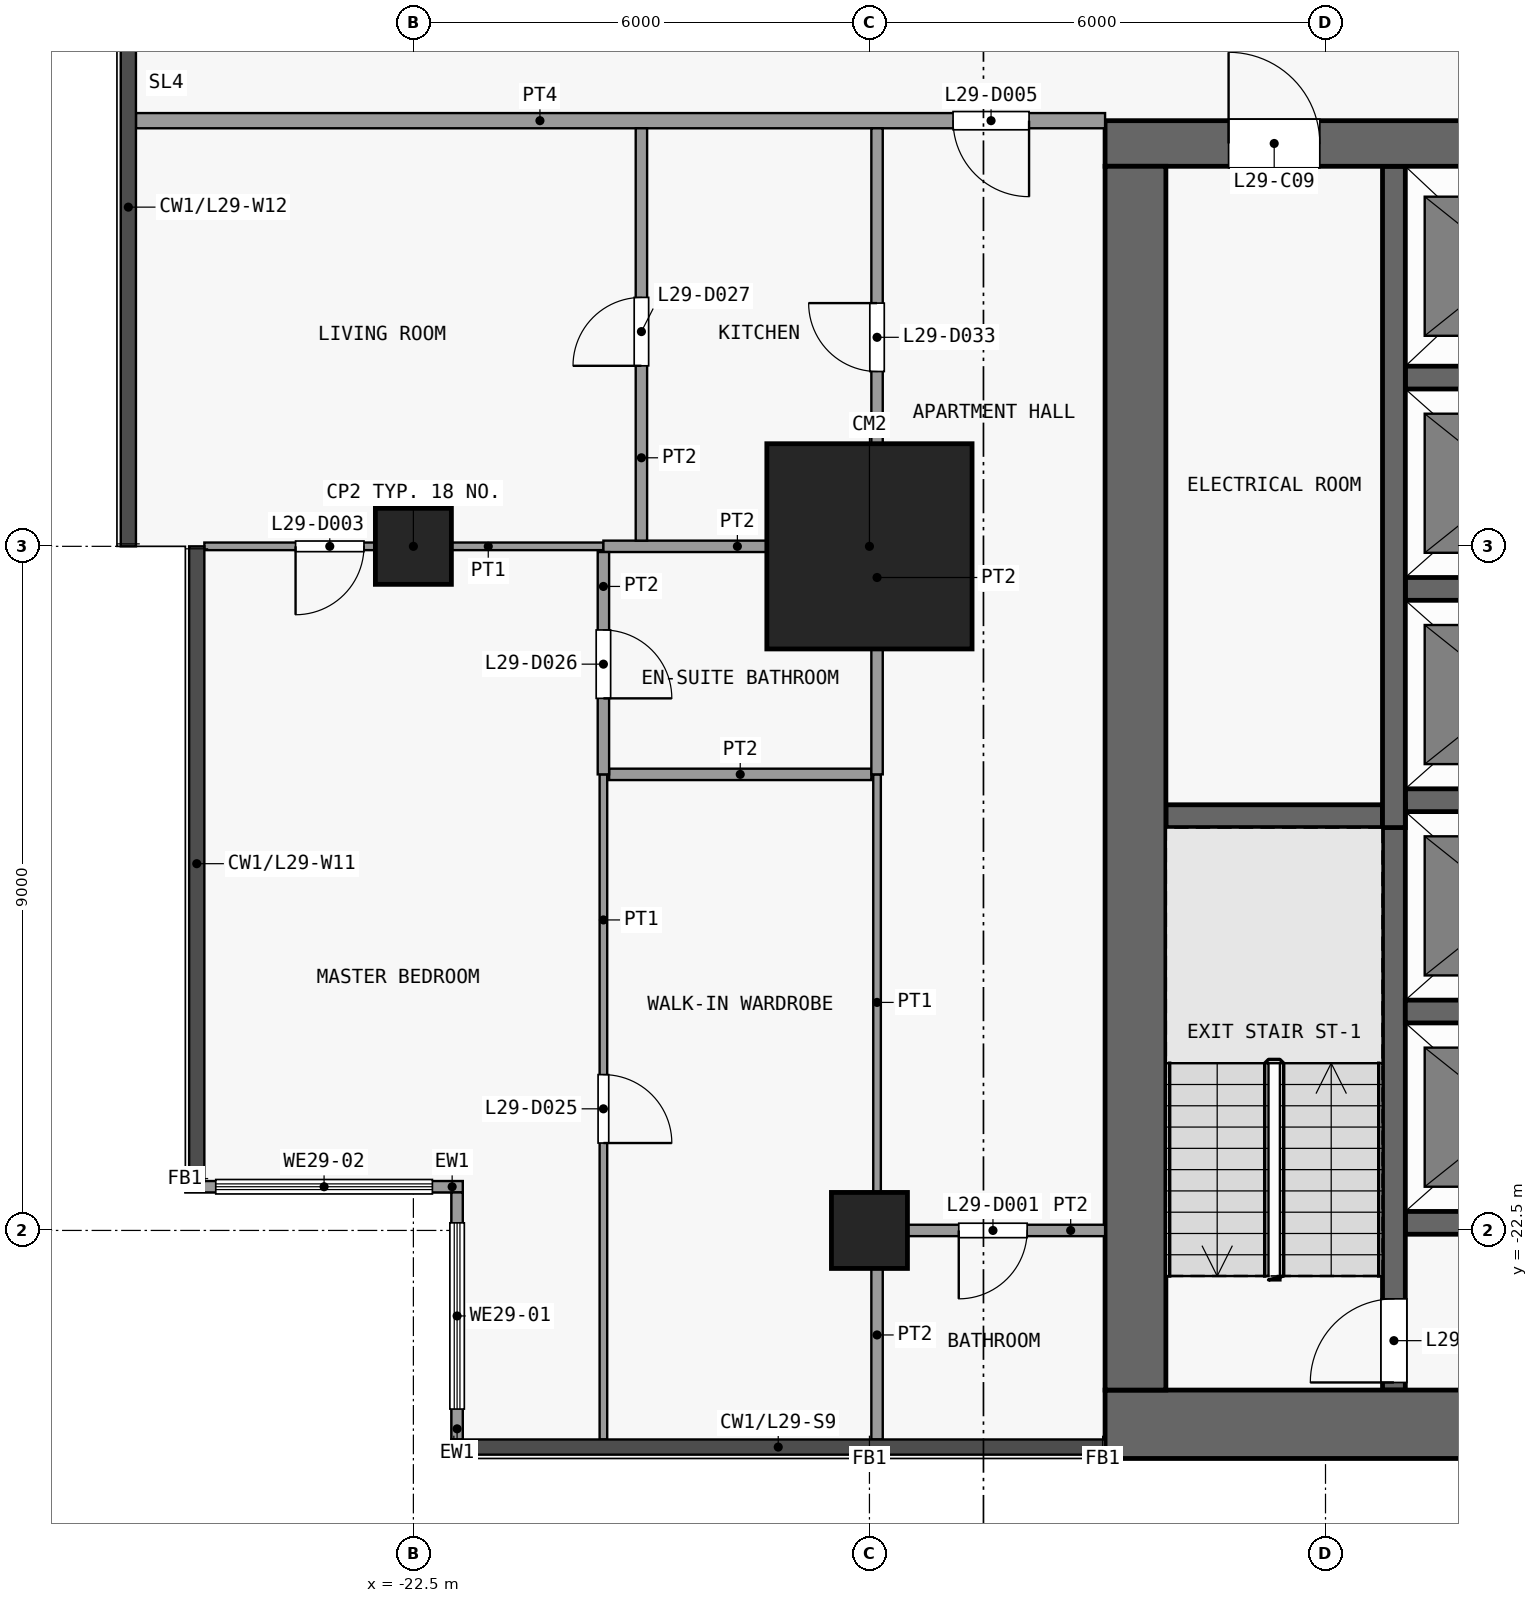
"""IFC4 building model, lengths in metres.
Left out: names, types, materials, properties, quantities, classifications, styles, units other than length and angle.
Written with IfcOpenShell. Run it as: python <this file> out.ifc"""

import sys

from ifc_helpers import new_model, si_unit, direction, frame, frame_2d, origin, origin_2d, place, context, subcontext, project, spatial, rectangle, extrude, element, fill, save


model = new_model("IFC4")
c1 = context("Model", 3, precision=1e-05, world=origin(), true_north=direction((0.0, 1.0)))
c2 = subcontext(c1, "Body", "Model", "MODEL_VIEW")
j1 = project(units=[si_unit("LENGTHUNIT", "METRE"), si_unit("PLANEANGLEUNIT", "RADIAN")], contexts=[c1])
p1 = place(None, origin())
s1 = spatial("IfcSite", under=j1, at=p1, CompositionType="ELEMENT")
p2 = place(p1, origin())
s2 = spatial("IfcBuilding", under=s1, at=p2, CompositionType="ELEMENT")
p3 = place(p2, frame((0.0, 0.0, 117.1)))
s3 = spatial("IfcBuildingStorey", under=s2, at=p3, CompositionType="ELEMENT", Elevation=117.1)
for number, where, z_axis, x_axis in (
    (1, (-22.5, -13.5, 0.0), (0.0, 0.0, 1.0), (1.0, 0.0, 0.0)),
    (2, (-16.5, -22.5, 0.0), (0.0, 0.0, 1.0), (1.0, 0.0, 0.0)),
):
    element("IfcColumn", number, at=place(p3, frame(where, z_axis=z_axis, x_axis=x_axis)), inside=s3, PredefinedType="COLUMN", context=c2, shape_type="SweptSolid", body=[
        extrude(rectangle(XDim=1.0, YDim=1.0, at=origin_2d()), origin(), (0.0, 0.0, 1.0), 3.6),
    ])
p4 = place(p3, frame((-16.5, -13.5, 0.0), z_axis=(0.0, 0.0, 1.0), x_axis=(1.0, 0.0, 0.0)))
e3 = element("IfcColumn", 3, at=p4, inside=s3, PredefinedType="COLUMN", context=c2, shape_type="SweptSolid", body=[
    extrude(rectangle(XDim=2.7, YDim=2.7, at=origin_2d()), origin(), (0.0, 0.0, 1.0), 3.6),
])
p5 = place(p3, frame((-13.4, -25.05, 0.0), z_axis=(0.0, 0.0, 1.0), x_axis=(1.0, 0.0, 0.0)))
e4 = element("IfcWall", 4, at=p5, inside=s3, PredefinedType="SHEAR", context=c2, shape_type="SweptSolid", body=[
    extrude(rectangle(XDim=26.8, YDim=0.9, at=frame_2d((13.4, 0.0))), origin(), (0.0, 0.0, 1.0), 3.3),
])
p6 = place(p3, frame((-13.4, -8.2, 0.0), z_axis=(0.0, 0.0, 1.0), x_axis=(1.0, 0.0, 0.0)))
e5 = element("IfcWall", 5, at=p6, inside=s3, PredefinedType="SHEAR", context=c2, shape_type="SweptSolid", body=[
    extrude(rectangle(XDim=26.8, YDim=0.6, at=frame_2d((13.4, 0.0))), origin(), (0.0, 0.0, 1.0), 3.3),
])
p7 = place(p6, frame((7.7, 0.0, 0.0)))
e6 = element("IfcOpeningElement", 6, at=p7, cuts=e5, PredefinedType="OPENING", context=c2, shape_type="SweptSolid", body=[
    extrude(rectangle(XDim=1.8, YDim=2.1, at=frame_2d((0.9, 1.05))), frame((0.0, 0.31, 0.0), z_axis=(0.0, -1.0, 0.0), x_axis=(1.0, 0.0, 0.0)), (0.0, 0.0, 1.0), 0.62),
])
p8 = place(p6, frame((17.3, 0.0, 0.0)))
e7 = element("IfcOpeningElement", 7, at=p8, cuts=e5, PredefinedType="OPENING", context=c2, shape_type="SweptSolid", body=[
    extrude(rectangle(XDim=1.8, YDim=2.1, at=frame_2d((0.9, 1.05))), frame((0.0, 0.31, 0.0), z_axis=(0.0, -1.0, 0.0), x_axis=(1.0, 0.0, 0.0)), (0.0, 0.0, 1.0), 0.62),
])
p9 = place(p6, frame((1.625, 0.0, 0.0)))
e8 = element("IfcOpeningElement", 8, at=p9, cuts=e5, PredefinedType="OPENING", context=c2, shape_type="SweptSolid", body=[
    extrude(rectangle(XDim=1.2, YDim=2.1, at=frame_2d((0.6, 1.05))), frame((0.0, 0.31, 0.0), z_axis=(0.0, -1.0, 0.0), x_axis=(1.0, 0.0, 0.0)), (0.0, 0.0, 1.0), 0.62),
])
p10 = place(p6, frame((23.275, 0.0, 0.0)))
e9 = element("IfcOpeningElement", 9, at=p10, cuts=e5, PredefinedType="OPENING", context=c2, shape_type="SweptSolid", body=[
    extrude(rectangle(XDim=0.9, YDim=2.1, at=frame_2d((0.45, 1.05))), frame((0.0, 0.31, 0.0), z_axis=(0.0, -1.0, 0.0), x_axis=(1.0, 0.0, 0.0)), (0.0, 0.0, 1.0), 0.62),
])
p11 = place(p3, frame((-13.0, -24.6, 0.0), z_axis=(0.0, 0.0, 1.0), x_axis=(0.0, 1.0, 0.0)))
e10 = element("IfcWall", 10, at=p11, inside=s3, PredefinedType="SHEAR", context=c2, shape_type="SweptSolid", body=[
    extrude(rectangle(XDim=16.1, YDim=0.8, at=frame_2d((8.05, 0.0))), origin(), (0.0, 0.0, 1.0), 3.3),
])
for number, where, z_axis, x_axis in (
    (11, (-9.45, -22.4, 0.0), (0.0, 0.0, 1.0), (1.0, 0.0, 0.0)),
    (12, (-9.45, -19.62, 0.0), (0.0, 0.0, 1.0), (1.0, 0.0, 0.0)),
):
    element("IfcWall", number, at=place(p3, frame(where, z_axis=z_axis, x_axis=x_axis)), inside=s3, PredefinedType="SHEAR", context=c2, shape_type="SweptSolid", body=[
        extrude(rectangle(XDim=2.8, YDim=0.3, at=frame_2d((1.4, 0.0))), origin(), (0.0, 0.0, 1.0), 3.3),
    ])
p12 = place(p3, frame((-12.6, -17.05, 0.0), z_axis=(0.0, 0.0, 1.0), x_axis=(1.0, 0.0, 0.0)))
e13 = element("IfcWall", 13, at=p12, inside=s3, PredefinedType="SHEAR", context=c2, shape_type="SweptSolid", body=[
    extrude(rectangle(XDim=2.85, YDim=0.3, at=frame_2d((1.425, 0.0))), origin(), (0.0, 0.0, 1.0), 3.3),
])
for number, where, z_axis, x_axis in (
    (14, (-9.45, -16.84, 0.0), (0.0, 0.0, 1.0), (1.0, 0.0, 0.0)),
    (15, (-9.45, -14.06, 0.0), (0.0, 0.0, 1.0), (1.0, 0.0, 0.0)),
    (16, (-9.45, -11.28, 0.0), (0.0, 0.0, 1.0), (1.0, 0.0, 0.0)),
):
    element("IfcWall", number, at=place(p3, frame(where, z_axis=z_axis, x_axis=x_axis)), inside=s3, PredefinedType="SHEAR", context=c2, shape_type="SweptSolid", body=[
        extrude(rectangle(XDim=2.8, YDim=0.3, at=frame_2d((1.4, 0.0))), origin(), (0.0, 0.0, 1.0), 3.3),
    ])
p13 = place(p3, frame((-9.6, -24.6, 0.0), z_axis=(0.0, 0.0, 1.0), x_axis=(0.0, 1.0, 0.0)))
e17 = element("IfcWall", 17, at=p13, inside=s3, PredefinedType="SHEAR", context=c2, shape_type="SweptSolid", body=[
    extrude(rectangle(XDim=7.7, YDim=0.3, at=frame_2d((3.85, 0.0))), origin(), (0.0, 0.0, 1.0), 3.3),
])
p14 = place(p13, frame((0.1, 0.0, 0.0)))
e18 = element("IfcOpeningElement", 18, at=p14, cuts=e17, PredefinedType="OPENING", context=c2, shape_type="SweptSolid", body=[
    extrude(rectangle(XDim=1.1, YDim=2.1, at=frame_2d((0.55, 1.05))), frame((0.0, 0.16, 0.0), z_axis=(0.0, -1.0, 0.0), x_axis=(1.0, 0.0, 0.0)), (0.0, 0.0, 1.0), 0.32),
])
p15 = place(p3, frame((-9.6, -17.2, 0.0), z_axis=(0.0, 0.0, 1.0), x_axis=(0.0, 1.0, 0.0)))
e19 = element("IfcWall", 19, at=p15, inside=s3, PredefinedType="SHEAR", context=c2, shape_type="SweptSolid", body=[
    extrude(rectangle(XDim=8.7, YDim=0.3, at=frame_2d((4.35, 0.0))), origin(), (0.0, 0.0, 1.0), 3.3),
])
p16 = place(p3, frame((-21.925, -25.25, 0.0), z_axis=(0.0, 0.0, 1.0), x_axis=(0.0, 1.0, 0.0)))
e20 = element("IfcWall", 20, at=p16, inside=s3, PredefinedType="SOLIDWALL", context=c2, shape_type="SweptSolid", body=[
    extrude(rectangle(XDim=3.25, YDim=0.15, at=frame_2d((1.625, 0.0))), origin(), (0.0, 0.0, 1.0), 3.3),
])
p17 = place(p16, frame((0.4, 0.0, 0.9)))
e21 = element("IfcOpeningElement", 21, at=p17, cuts=e20, PredefinedType="OPENING", context=c2, shape_type="SweptSolid", body=[
    extrude(rectangle(XDim=2.45, YDim=2.4, at=frame_2d((1.225, 1.2))), frame((0.0, 0.085, 0.0), z_axis=(0.0, -1.0, 0.0), x_axis=(1.0, 0.0, 0.0)), (0.0, 0.0, 1.0), 0.17),
])
p18 = place(p3, frame((-21.85, -21.925, 0.0), z_axis=(0.0, 0.0, 1.0), x_axis=(-1.0, 0.0, 0.0)))
e22 = element("IfcWall", 22, at=p18, inside=s3, PredefinedType="SOLIDWALL", context=c2, shape_type="SweptSolid", body=[
    extrude(rectangle(XDim=3.65, YDim=0.15, at=frame_2d((1.825, 0.0))), origin(), (0.0, 0.0, 1.0), 3.3),
])
p19 = place(p18, frame((0.4, 0.0, 0.9)))
e23 = element("IfcOpeningElement", 23, at=p19, cuts=e22, PredefinedType="OPENING", context=c2, shape_type="SweptSolid", body=[
    extrude(rectangle(XDim=2.85, YDim=2.4, at=frame_2d((1.425, 1.2))), frame((0.0, 0.085, 0.0), z_axis=(0.0, -1.0, 0.0), x_axis=(1.0, 0.0, 0.0)), (0.0, 0.0, 1.0), 0.17),
])
p20 = place(p3, frame((-16.325, -22.5, 0.0), z_axis=(0.0, 0.0, 1.0), x_axis=(1.0, 0.0, 0.0)))
e24 = element("IfcWall", 24, at=p20, inside=s3, PredefinedType="PARTITIONING", context=c2, shape_type="SweptSolid", body=[
    extrude(rectangle(XDim=2.925, YDim=0.15, at=frame_2d((1.462, 0.0))), origin(), (0.0, 0.0, 1.0), 3.3),
])
p21 = place(p20, frame((1.0, 0.0, 0.0)))
e25 = element("IfcOpeningElement", 25, at=p21, cuts=e24, PredefinedType="OPENING", context=c2, shape_type="SweptSolid", body=[
    extrude(rectangle(XDim=0.9, YDim=2.1, at=frame_2d((0.45, 1.05))), frame((0.0, 0.085, 0.0), z_axis=(0.0, -1.0, 0.0), x_axis=(1.0, 0.0, 0.0)), (0.0, 0.0, 1.0), 0.17),
])
p22 = place(p3, frame((-19.925, -16.5, 0.0), z_axis=(0.0, 0.0, 1.0), x_axis=(1.0, 0.0, 0.0)))
e26 = element("IfcWall", 26, at=p22, inside=s3, PredefinedType="PARTITIONING", context=c2, shape_type="SweptSolid", body=[
    extrude(rectangle(XDim=3.45, YDim=0.15, at=frame_2d((1.725, 0.0))), origin(), (0.0, 0.0, 1.0), 3.3),
])
p23 = place(p3, frame((-25.25, -13.5, 0.0), z_axis=(0.0, 0.0, 1.0), x_axis=(1.0, 0.0, 0.0)))
e27 = element("IfcWall", 27, at=p23, inside=s3, PredefinedType="PARTITIONING", context=c2, shape_type="SweptSolid", body=[
    extrude(rectangle(XDim=5.25, YDim=0.1, at=frame_2d((2.625, 0.0))), origin(), (0.0, 0.0, 1.0), 3.3),
])
p24 = place(p23, frame((1.2, 0.0, 0.0)))
e28 = element("IfcOpeningElement", 28, at=p24, cuts=e27, PredefinedType="OPENING", context=c2, shape_type="SweptSolid", body=[
    extrude(rectangle(XDim=0.9, YDim=2.1, at=frame_2d((0.45, 1.05))), frame((0.0, 0.06, 0.0), z_axis=(0.0, -1.0, 0.0), x_axis=(1.0, 0.0, 0.0)), (0.0, 0.0, 1.0), 0.12),
])
p25 = place(p3, frame((-20.0, -13.5, 0.0), z_axis=(0.0, 0.0, 1.0), x_axis=(1.0, 0.0, 0.0)))
e29 = element("IfcWall", 29, at=p25, inside=s3, PredefinedType="PARTITIONING", context=c2, shape_type="SweptSolid", body=[
    extrude(rectangle(XDim=3.525, YDim=0.15, at=frame_2d((1.762, 0.0))), origin(), (0.0, 0.0, 1.0), 3.3),
])
p26 = place(p3, frame((-26.15, -7.9, 0.0), z_axis=(0.0, 0.0, 1.0), x_axis=(1.0, 0.0, 0.0)))
e30 = element("IfcWall", 30, at=p26, inside=s3, PredefinedType="PARTITIONING", context=c2, shape_type="SweptSolid", body=[
    extrude(rectangle(XDim=12.75, YDim=0.2, at=frame_2d((6.375, 0.0))), origin(), (0.0, 0.0, 1.0), 3.3),
])
p27 = place(p26, frame((10.75, 0.0, 0.0)))
e31 = element("IfcOpeningElement", 31, at=p27, cuts=e30, PredefinedType="OPENING", context=c2, shape_type="SweptSolid", body=[
    extrude(rectangle(XDim=1.0, YDim=2.1, at=frame_2d((0.5, 1.05))), frame((0.0, 0.11, 0.0), z_axis=(0.0, -1.0, 0.0), x_axis=(1.0, 0.0, 0.0)), (0.0, 0.0, 1.0), 0.22),
])
p28 = place(p3, frame((-20.0, -25.25, 0.0), z_axis=(0.0, 0.0, 1.0), x_axis=(0.0, 1.0, 0.0)))
e32 = element("IfcWall", 32, at=p28, inside=s3, PredefinedType="PARTITIONING", context=c2, shape_type="SweptSolid", body=[
    extrude(rectangle(XDim=8.75, YDim=0.1, at=frame_2d((4.375, 0.0))), origin(), (0.0, 0.0, 1.0), 3.3),
])
p29 = place(p28, frame((3.9, 0.0, 0.0)))
e33 = element("IfcOpeningElement", 33, at=p29, cuts=e32, PredefinedType="OPENING", context=c2, shape_type="SweptSolid", body=[
    extrude(rectangle(XDim=0.9, YDim=2.1, at=frame_2d((0.45, 1.05))), frame((0.0, 0.06, 0.0), z_axis=(0.0, -1.0, 0.0), x_axis=(1.0, 0.0, 0.0)), (0.0, 0.0, 1.0), 0.12),
])
p30 = place(p3, frame((-20.0, -16.5, 0.0), z_axis=(0.0, 0.0, 1.0), x_axis=(0.0, 1.0, 0.0)))
e34 = element("IfcWall", 34, at=p30, inside=s3, PredefinedType="PARTITIONING", context=c2, shape_type="SweptSolid", body=[
    extrude(rectangle(XDim=2.925, YDim=0.15, at=frame_2d((1.462, 0.0))), origin(), (0.0, 0.0, 1.0), 3.3),
])
p31 = place(p30, frame((1.0, 0.0, 0.0)))
e35 = element("IfcOpeningElement", 35, at=p31, cuts=e34, PredefinedType="OPENING", context=c2, shape_type="SweptSolid", body=[
    extrude(rectangle(XDim=0.9, YDim=2.1, at=frame_2d((0.45, 1.05))), frame((0.0, 0.085, 0.0), z_axis=(0.0, -1.0, 0.0), x_axis=(1.0, 0.0, 0.0)), (0.0, 0.0, 1.0), 0.17),
])
p32 = place(p3, frame((-19.5, -13.425, 0.0), z_axis=(0.0, 0.0, 1.0), x_axis=(0.0, 1.0, 0.0)))
e36 = element("IfcWall", 36, at=p32, inside=s3, PredefinedType="PARTITIONING", context=c2, shape_type="SweptSolid", body=[
    extrude(rectangle(XDim=5.425, YDim=0.15, at=frame_2d((2.712, 0.0))), origin(), (0.0, 0.0, 1.0), 3.3),
])
p33 = place(p32, frame((2.3, 0.0, 0.0)))
e37 = element("IfcOpeningElement", 37, at=p33, cuts=e36, PredefinedType="OPENING", context=c2, shape_type="SweptSolid", body=[
    extrude(rectangle(XDim=0.9, YDim=2.1, at=frame_2d((0.45, 1.05))), frame((0.0, 0.085, 0.0), z_axis=(0.0, -1.0, 0.0), x_axis=(1.0, 0.0, 0.0)), (0.0, 0.0, 1.0), 0.17),
])
p34 = place(p3, frame((-16.4, -22.5, 0.0), z_axis=(0.0, 0.0, 1.0), x_axis=(0.0, 1.0, 0.0)))
e38 = element("IfcWall", 38, at=p34, inside=s3, PredefinedType="PARTITIONING", context=c2, shape_type="SweptSolid", body=[
    extrude(rectangle(XDim=6.0, YDim=0.1, at=frame_2d((3.0, 0.0))), origin(), (0.0, 0.0, 1.0), 3.3),
])
p35 = place(p3, frame((-16.4, -25.25, 0.0), z_axis=(0.0, 0.0, 1.0), x_axis=(0.0, 1.0, 0.0)))
e39 = element("IfcWall", 39, at=p35, inside=s3, PredefinedType="PARTITIONING", context=c2, shape_type="SweptSolid", body=[
    extrude(rectangle(XDim=2.75, YDim=0.15, at=frame_2d((1.375, 0.0))), origin(), (0.0, 0.0, 1.0), 3.3),
])
p36 = place(p3, frame((-16.4, -16.5, 0.0), z_axis=(0.0, 0.0, 1.0), x_axis=(0.0, 1.0, 0.0)))
e40 = element("IfcWall", 40, at=p36, inside=s3, PredefinedType="PARTITIONING", context=c2, shape_type="SweptSolid", body=[
    extrude(rectangle(XDim=8.5, YDim=0.15, at=frame_2d((4.25, 0.0))), origin(), (0.0, 0.0, 1.0), 3.3),
])
p37 = place(p36, frame((5.3, 0.0, 0.0)))
e41 = element("IfcOpeningElement", 41, at=p37, cuts=e40, PredefinedType="OPENING", context=c2, shape_type="SweptSolid", body=[
    extrude(rectangle(XDim=0.9, YDim=2.1, at=frame_2d((0.45, 1.05))), frame((0.0, 0.085, 0.0), z_axis=(0.0, -1.0, 0.0), x_axis=(1.0, 0.0, 0.0)), (0.0, 0.0, 1.0), 0.17),
])
p38 = place(p9, origin())
e42 = element("IfcDoor", 42, at=p38, inside=s3, OperationType="SINGLE_SWING_LEFT", PredefinedType="DOOR", context=c2, shape_type="SweptSolid", body=[
    extrude(rectangle(XDim=1.2, YDim=2.1, at=frame_2d((0.6, 1.05))), frame((0.0, 0.025, 0.0), z_axis=(0.0, -1.0, 0.0), x_axis=(1.0, 0.0, 0.0)), (0.0, 0.0, 1.0), 0.05),
])
fill(e8, e42)
p39 = place(p14, origin())
e43 = element("IfcDoor", 43, at=p39, inside=s3, OperationType="SINGLE_SWING_LEFT", PredefinedType="DOOR", context=c2, shape_type="SweptSolid", body=[
    extrude(rectangle(XDim=1.1, YDim=2.1, at=frame_2d((0.55, 1.05))), frame((0.0, 0.025, 0.0), z_axis=(0.0, -1.0, 0.0), x_axis=(1.0, 0.0, 0.0)), (0.0, 0.0, 1.0), 0.05),
])
fill(e18, e43)
p40 = place(p17, origin())
e44 = element("IfcWindow", 44, at=p40, inside=s3, PartitioningType="SINGLE_PANEL", PredefinedType="WINDOW", context=c2, shape_type="SweptSolid", body=[
    extrude(rectangle(XDim=2.45, YDim=2.4, at=frame_2d((1.225, 1.2))), frame((0.0, 0.03, 0.0), z_axis=(0.0, -1.0, 0.0), x_axis=(1.0, 0.0, 0.0)), (0.0, 0.0, 1.0), 0.06),
])
fill(e21, e44)
p41 = place(p19, origin())
e45 = element("IfcWindow", 45, at=p41, inside=s3, PartitioningType="SINGLE_PANEL", PredefinedType="WINDOW", context=c2, shape_type="SweptSolid", body=[
    extrude(rectangle(XDim=2.85, YDim=2.4, at=frame_2d((1.425, 1.2))), frame((0.0, 0.03, 0.0), z_axis=(0.0, -1.0, 0.0), x_axis=(1.0, 0.0, 0.0)), (0.0, 0.0, 1.0), 0.06),
])
fill(e23, e45)
p42 = place(p21, origin())
e46 = element("IfcDoor", 46, at=p42, inside=s3, OperationType="SINGLE_SWING_LEFT", PredefinedType="DOOR", context=c2, shape_type="SweptSolid", body=[
    extrude(rectangle(XDim=0.9, YDim=2.1, at=frame_2d((0.45, 1.05))), frame((0.0, 0.025, 0.0), z_axis=(0.0, -1.0, 0.0), x_axis=(1.0, 0.0, 0.0)), (0.0, 0.0, 1.0), 0.05),
])
fill(e25, e46)
p43 = place(p24, origin())
e47 = element("IfcDoor", 47, at=p43, inside=s3, OperationType="SINGLE_SWING_LEFT", PredefinedType="DOOR", context=c2, shape_type="SweptSolid", body=[
    extrude(rectangle(XDim=0.9, YDim=2.1, at=frame_2d((0.45, 1.05))), frame((0.0, 0.025, 0.0), z_axis=(0.0, -1.0, 0.0), x_axis=(1.0, 0.0, 0.0)), (0.0, 0.0, 1.0), 0.05),
])
fill(e28, e47)
p44 = place(p27, origin())
e48 = element("IfcDoor", 48, at=p44, inside=s3, OperationType="SINGLE_SWING_RIGHT", PredefinedType="DOOR", context=c2, shape_type="SweptSolid", body=[
    extrude(rectangle(XDim=1.0, YDim=2.1, at=frame_2d((0.5, 1.05))), frame((0.0, 0.025, 0.0), z_axis=(0.0, -1.0, 0.0), x_axis=(1.0, 0.0, 0.0)), (0.0, 0.0, 1.0), 0.05),
])
fill(e31, e48)
p45 = place(p29, origin())
e49 = element("IfcDoor", 49, at=p45, inside=s3, OperationType="SINGLE_SWING_LEFT", PredefinedType="DOOR", context=c2, shape_type="SweptSolid", body=[
    extrude(rectangle(XDim=0.9, YDim=2.1, at=frame_2d((0.45, 1.05))), frame((0.0, 0.025, 0.0), z_axis=(0.0, -1.0, 0.0), x_axis=(1.0, 0.0, 0.0)), (0.0, 0.0, 1.0), 0.05),
])
fill(e33, e49)
p46 = place(p31, origin())
e50 = element("IfcDoor", 50, at=p46, inside=s3, OperationType="SINGLE_SWING_LEFT", PredefinedType="DOOR", context=c2, shape_type="SweptSolid", body=[
    extrude(rectangle(XDim=0.9, YDim=2.1, at=frame_2d((0.45, 1.05))), frame((0.0, 0.025, 0.0), z_axis=(0.0, -1.0, 0.0), x_axis=(1.0, 0.0, 0.0)), (0.0, 0.0, 1.0), 0.05),
])
fill(e35, e50)
p47 = place(p33, origin())
e51 = element("IfcDoor", 51, at=p47, inside=s3, OperationType="SINGLE_SWING_RIGHT", PredefinedType="DOOR", context=c2, shape_type="SweptSolid", body=[
    extrude(rectangle(XDim=0.9, YDim=2.1, at=frame_2d((0.45, 1.05))), frame((0.0, 0.025, 0.0), z_axis=(0.0, -1.0, 0.0), x_axis=(1.0, 0.0, 0.0)), (0.0, 0.0, 1.0), 0.05),
])
fill(e37, e51)
p48 = place(p37, origin())
e52 = element("IfcDoor", 52, at=p48, inside=s3, OperationType="SINGLE_SWING_LEFT", PredefinedType="DOOR", context=c2, shape_type="SweptSolid", body=[
    extrude(rectangle(XDim=0.9, YDim=2.1, at=frame_2d((0.45, 1.05))), frame((0.0, 0.025, 0.0), z_axis=(0.0, -1.0, 0.0), x_axis=(1.0, 0.0, 0.0)), (0.0, 0.0, 1.0), 0.05),
])
fill(e41, e52)
save(model, sys.argv[1])
